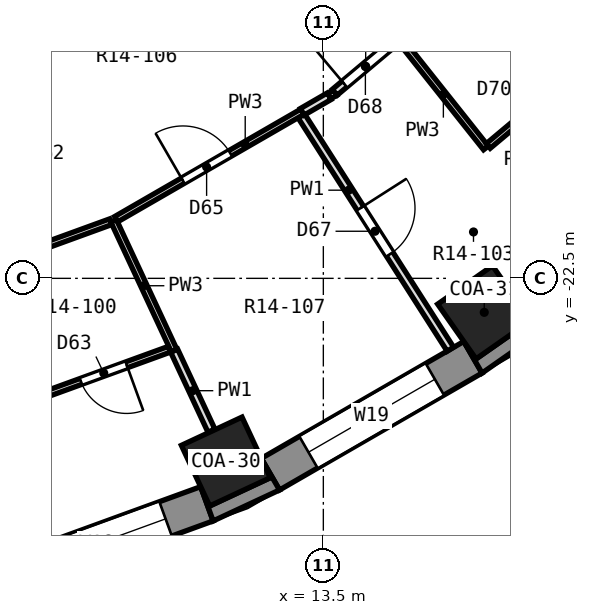
"""IFC4 building model, lengths in metres.
Left out: names, types, materials, properties, quantities, classifications, styles, units other than length and angle.
Written with IfcOpenShell. Run it as: python <this file> out.ifc"""

import sys

from ifc_helpers import new_model, si_unit, direction, frame, frame_2d, origin, origin_2d, place, context, subcontext, project, spatial, polyline, rectangle, outline, extrude, element, fill, save


model = new_model("IFC4")
c1 = context("Model", 3, precision=1e-05, world=origin(), true_north=direction((0.0, 1.0)))
c2 = subcontext(c1, "Body", "Model", "MODEL_VIEW")
j1 = project(units=[si_unit("LENGTHUNIT", "METRE"), si_unit("PLANEANGLEUNIT", "RADIAN")], contexts=[c1])
p1 = place(None, origin())
s1 = spatial("IfcSite", under=j1, at=p1, CompositionType="ELEMENT")
p2 = place(p1, origin())
s2 = spatial("IfcBuilding", under=s1, at=p2, CompositionType="ELEMENT")
p3 = place(p2, frame((0.0, 0.0, 75.8)))
s3 = spatial("IfcBuildingStorey", under=s2, at=p3, CompositionType="ELEMENT", Elevation=75.8)
for number, where, z_axis, x_axis in (
    (1, (11.897, -25.512, 0.0), (0.0, 0.0, 1.0), (0.423, -0.906, 0.0)),
    (2, (16.146, -23.059, 0.0), (0.0, 0.0, 1.0), (0.574, -0.819, 0.0)),
):
    element("IfcColumn", number, at=place(p3, frame(where, z_axis=z_axis, x_axis=x_axis)), inside=s3, PredefinedType="COLUMN", context=c2, shape_type="SweptSolid", body=[
        extrude(rectangle(XDim=1.1, YDim=1.1, at=origin_2d()), origin(), (0.0, 0.0, 1.0), 3.3),
    ])
p4 = place(p3, frame((7.971, -27.523, 0.0), z_axis=(0.0, 0.0, 1.0), x_axis=(0.939689588564, 0.342028474173, 0.0)))
e3 = element("IfcWall", 3, at=p4, inside=s3, PredefinedType="SOLIDWALL", context=c2, shape_type="SweptSolid", body=[
    extrude(rectangle(XDim=3.846, YDim=0.6, at=frame_2d((1.923, 0.0))), origin(), (0.0, 0.0, 1.0), 2.75),
])
p5 = place(p4, frame((0.723, 0.0, 0.9)))
e4 = element("IfcOpeningElement", 4, at=p5, cuts=e3, PredefinedType="OPENING", context=c2, shape_type="SweptSolid", body=[
    extrude(rectangle(XDim=2.4, YDim=1.8, at=frame_2d((1.2, 0.9))), frame((0.0, 0.312, 0.0), z_axis=(0.0, -1.0, 0.0), x_axis=(1.0, 0.0, 0.0)), (0.0, 0.0, 1.0), 0.624),
])
p6 = place(p3, frame((12.63, -25.721, 0.0), z_axis=(0.0, 0.0, 1.0), x_axis=(0.86603124159, 0.499989888488, 0.0)))
e5 = element("IfcWall", 5, at=p6, inside=s3, PredefinedType="SOLIDWALL", context=c2, shape_type="SweptSolid", body=[
    extrude(rectangle(XDim=3.846, YDim=0.6, at=frame_2d((1.923, 0.0))), origin(), (0.0, 0.0, 1.0), 2.75),
])
p7 = place(p6, frame((0.723, 0.0, 0.9)))
e6 = element("IfcOpeningElement", 6, at=p7, cuts=e5, PredefinedType="OPENING", context=c2, shape_type="SweptSolid", body=[
    extrude(rectangle(XDim=2.4, YDim=1.8, at=frame_2d((1.2, 0.9))), frame((0.0, 0.312, 0.0), z_axis=(0.0, -1.0, 0.0), x_axis=(1.0, 0.0, 0.0)), (0.0, 0.0, 1.0), 0.624),
])
p8 = place(p3, origin())
e7 = element("IfcWall", 7, at=p8, inside=s3, PredefinedType="SOLIDWALL", context=c2, shape_type="SweptSolid", body=[
    extrude(outline(polyline([(12.78, -25.981), (12.479, -25.461), (12.628, -25.779), (11.631, -26.243), (11.483, -25.926), (11.688, -26.49), (12.78, -25.981)])), origin(), (0.0, 0.0, 1.0), 2.75),
])
p9 = place(p3, origin())
e8 = element("IfcWall", 8, at=p9, inside=s3, PredefinedType="SOLIDWALL", context=c2, shape_type="SweptSolid", body=[
    extrude(outline(polyline([(16.11, -24.058), (17.097, -23.367), (16.711, -22.907), (16.912, -23.194), (16.011, -23.825), (15.81, -23.538), (16.11, -24.058)])), origin(), (0.0, 0.0, 1.0), 2.75),
])
p10 = place(p3, frame((10.05, -21.552, 0.0), z_axis=(0.0, 0.0, 1.0), x_axis=(0.422500217466, -0.906362822627, 0.0)))
e9 = element("IfcWall", 9, at=p10, inside=s3, PredefinedType="PARTITIONING", context=c2, shape_type="SweptSolid", body=[
    extrude(rectangle(XDim=2.359, YDim=0.1, at=frame_2d((1.18, 0.0))), origin(), (0.0, 0.0, 1.0), 2.75),
])
p11 = place(p3, frame((11.047, -23.69, 0.0), z_axis=(0.0, 0.0, 1.0), x_axis=(0.42247077632, -0.906376546009, 0.0)))
e10 = element("IfcWall", 10, at=p11, inside=s3, PredefinedType="PARTITIONING", context=c2, shape_type="SweptSolid", body=[
    extrude(rectangle(XDim=1.45, YDim=0.125, at=frame_2d((0.725, 0.0))), origin(), (0.0, 0.0, 1.0), 2.75),
])
p12 = place(p3, frame((13.138, -19.828, 0.0), z_axis=(0.0, 0.0, 1.0), x_axis=(0.538359660084, -0.842715181063, 0.0)))
e11 = element("IfcWall", 11, at=p12, inside=s3, PredefinedType="PARTITIONING", context=c2, shape_type="SweptSolid", body=[
    extrude(rectangle(XDim=4.553, YDim=0.125, at=frame_2d((2.276, 0.0))), origin(), (0.0, 0.0, 1.0), 2.75),
])
p13 = place(p12, frame((1.802, 0.0, 0.0)))
e12 = element("IfcOpeningElement", 12, at=p13, cuts=e11, PredefinedType="OPENING", context=c2, shape_type="SweptSolid", body=[
    extrude(rectangle(XDim=0.9, YDim=2.1, at=frame_2d((0.45, 1.05))), frame((0.0, 0.074, 0.0), z_axis=(0.0, -1.0, 0.0), x_axis=(1.0, 0.0, 0.0)), (0.0, 0.0, 1.0), 0.149),
])
p14 = place(p3, frame((14.774, -18.593, 0.0), z_axis=(0.0, 0.0, 1.0), x_axis=(0.622124779816, -0.782918104491, 0.0)))
e13 = element("IfcWall", 13, at=p14, inside=s3, PredefinedType="PARTITIONING", context=c2, shape_type="SweptSolid", body=[
    extrude(rectangle(XDim=2.25, YDim=0.1, at=frame_2d((1.125, 0.0))), origin(), (0.0, 0.0, 1.0), 2.75),
])
p15 = place(p3, frame((8.799, -24.455, 0.0), z_axis=(0.0, 0.0, 1.0), x_axis=(0.939774884543, 0.341794040882, 0.0)))
e14 = element("IfcWall", 14, at=p15, inside=s3, PredefinedType="PARTITIONING", context=c2, shape_type="SweptSolid", body=[
    extrude(rectangle(XDim=2.307, YDim=0.1, at=frame_2d((1.154, 0.0))), origin(), (0.0, 0.0, 1.0), 2.75),
])
p16 = place(p15, frame((0.76, 0.0, 0.0)))
e15 = element("IfcOpeningElement", 15, at=p16, cuts=e14, PredefinedType="OPENING", context=c2, shape_type="SweptSolid", body=[
    extrude(rectangle(XDim=0.8, YDim=2.1, at=frame_2d((0.4, 1.05))), frame((0.0, 0.062, 0.0), z_axis=(0.0, -1.0, 0.0), x_axis=(1.0, 0.0, 0.0)), (0.0, 0.0, 1.0), 0.124),
])
p17 = place(p3, frame((8.025, -22.289, 0.0), z_axis=(0.0, 0.0, 1.0), x_axis=(0.939725675468, 0.341929312674, 0.0)))
e16 = element("IfcWall", 16, at=p17, inside=s3, PredefinedType="PARTITIONING", context=c2, shape_type="SweptSolid", body=[
    extrude(rectangle(XDim=2.105, YDim=0.1, at=frame_2d((1.052, 0.0))), origin(), (0.0, 0.0, 1.0), 2.75),
])
p18 = place(p3, frame((5.251, -19.367, 0.0), z_axis=(0.0, 0.0, 1.0), x_axis=(0.86701914354, 0.498274828519, 0.0)))
e17 = element("IfcWall", 17, at=p18, inside=s3, PredefinedType="PARTITIONING", context=c2, shape_type="SweptSolid", body=[
    extrude(rectangle(XDim=10.259, YDim=0.125, at=frame_2d((5.129, 0.0))), origin(), (0.0, 0.0, 1.0), 2.75),
])
p19 = place(p3, frame((10.093, -21.527, 0.0), z_axis=(0.0, 0.0, 1.0), x_axis=(0.866092412582, 0.499883919394, 0.0)))
e18 = element("IfcWall", 18, at=p19, inside=s3, PredefinedType="PARTITIONING", context=c2, shape_type="SweptSolid", body=[
    extrude(rectangle(XDim=3.534, YDim=0.1, at=frame_2d((1.767, 0.0))), origin(), (0.0, 0.0, 1.0), 2.75),
])
p20 = place(p19, frame((1.267, 0.0, 0.0)))
e19 = element("IfcOpeningElement", 19, at=p20, cuts=e18, PredefinedType="OPENING", context=c2, shape_type="SweptSolid", body=[
    extrude(rectangle(XDim=0.9, YDim=2.1, at=frame_2d((0.45, 1.05))), frame((0.0, 0.062, 0.0), z_axis=(0.0, -1.0, 0.0), x_axis=(1.0, 0.0, 0.0)), (0.0, 0.0, 1.0), 0.124),
])
p21 = place(p3, frame((13.597, -19.505, 0.0), z_axis=(0.0, 0.0, 1.0), x_axis=(0.86665063443, 0.498915501706, 0.0)))
e20 = element("IfcWall", 20, at=p21, inside=s3, PredefinedType="PARTITIONING", context=c2, shape_type="SweptSolid", body=[
    extrude(rectangle(XDim=0.114, YDim=0.1, at=frame_2d((0.057, 0.0))), origin(), (0.0, 0.0, 1.0), 2.75),
])
p22 = place(p3, frame((13.154, -19.761, 0.0), z_axis=(0.0, 0.0, 1.0), x_axis=(0.865644253932, 0.500659590574, 0.0)))
e21 = element("IfcWall", 21, at=p22, inside=s3, PredefinedType="PARTITIONING", context=c2, shape_type="SweptSolid", body=[
    extrude(rectangle(XDim=0.511, YDim=0.125, at=frame_2d((0.255, 0.0))), origin(), (0.0, 0.0, 1.0), 2.75),
])
p23 = place(p3, frame((16.212, -20.323, 0.0), z_axis=(0.0, 0.0, 1.0), x_axis=(0.766232462385, 0.642563470474, 0.0)))
e22 = element("IfcWall", 22, at=p23, inside=s3, PredefinedType="PARTITIONING", context=c2, shape_type="SweptSolid", body=[
    extrude(rectangle(XDim=2.843, YDim=0.1, at=frame_2d((1.421, 0.0))), origin(), (0.0, 0.0, 1.0), 2.75),
])
p24 = place(p23, frame((1.034, 0.0, 0.0)))
e23 = element("IfcOpeningElement", 23, at=p24, cuts=e22, PredefinedType="OPENING", context=c2, shape_type="SweptSolid", body=[
    extrude(rectangle(XDim=0.8, YDim=2.1, at=frame_2d((0.4, 1.05))), frame((0.0, 0.062, 0.0), z_axis=(0.0, -1.0, 0.0), x_axis=(1.0, 0.0, 0.0)), (0.0, 0.0, 1.0), 0.124),
])
p25 = place(p3, frame((13.688, -19.44, 0.0), z_axis=(0.0, 0.0, 1.0), x_axis=(0.765864266058, 0.643002275249, 0.0)))
e24 = element("IfcWall", 24, at=p25, inside=s3, PredefinedType="PARTITIONING", context=c2, shape_type="SweptSolid", body=[
    extrude(rectangle(XDim=1.327, YDim=0.125, at=frame_2d((0.664, 0.0))), origin(), (0.0, 0.0, 1.0), 2.75),
])
p26 = place(p25, frame((0.208, 0.0, 0.0)))
e25 = element("IfcOpeningElement", 25, at=p26, cuts=e24, PredefinedType="OPENING", context=c2, shape_type="SweptSolid", body=[
    extrude(rectangle(XDim=0.9, YDim=2.1, at=frame_2d((0.45, 1.05))), frame((0.0, 0.074, 0.0), z_axis=(0.0, -1.0, 0.0), x_axis=(1.0, 0.0, 0.0)), (0.0, 0.0, 1.0), 0.149),
])
p27 = place(p5, origin())
e26 = element("IfcWindow", 26, at=p27, inside=s3, PartitioningType="SINGLE_PANEL", PredefinedType="WINDOW", context=c2, shape_type="SweptSolid", body=[
    extrude(rectangle(XDim=2.4, YDim=1.8, at=frame_2d((1.2, 0.9))), frame((0.0, 0.18, 0.0), z_axis=(0.0, -1.0, 0.0), x_axis=(1.0, 0.0, 0.0)), (0.0, 0.0, 1.0), 0.06),
])
fill(e4, e26)
p28 = place(p7, origin())
e27 = element("IfcWindow", 27, at=p28, inside=s3, PartitioningType="SINGLE_PANEL", PredefinedType="WINDOW", context=c2, shape_type="SweptSolid", body=[
    extrude(rectangle(XDim=2.4, YDim=1.8, at=frame_2d((1.2, 0.9))), frame((0.0, 0.18, 0.0), z_axis=(0.0, -1.0, 0.0), x_axis=(1.0, 0.0, 0.0)), (0.0, 0.0, 1.0), 0.06),
])
fill(e6, e27)
p29 = place(p16, frame((0.8, 0.0, 0.0), z_axis=(0.0, 0.0, 1.0), x_axis=(-1.0, 0.0, 0.0)))
e28 = element("IfcDoor", 28, at=p29, inside=s3, OperationType="SINGLE_SWING_LEFT", PredefinedType="DOOR", context=c2, shape_type="SweptSolid", body=[
    extrude(rectangle(XDim=0.8, YDim=2.1, at=frame_2d((0.4, 1.05))), frame((0.0, 0.025, 0.0), z_axis=(0.0, -1.0, 0.0), x_axis=(1.0, 0.0, 0.0)), (0.0, 0.0, 1.0), 0.05),
])
fill(e15, e28)
p30 = place(p20, origin())
e29 = element("IfcDoor", 29, at=p30, inside=s3, OperationType="SINGLE_SWING_LEFT", PredefinedType="DOOR", context=c2, shape_type="SweptSolid", body=[
    extrude(rectangle(XDim=0.9, YDim=2.1, at=frame_2d((0.45, 1.05))), frame((0.0, 0.025, 0.0), z_axis=(0.0, -1.0, 0.0), x_axis=(1.0, 0.0, 0.0)), (0.0, 0.0, 1.0), 0.05),
])
fill(e19, e29)
p31 = place(p13, origin())
e30 = element("IfcDoor", 30, at=p31, inside=s3, OperationType="SINGLE_SWING_LEFT", PredefinedType="DOOR", context=c2, shape_type="SweptSolid", body=[
    extrude(rectangle(XDim=0.9, YDim=2.1, at=frame_2d((0.45, 1.05))), frame((0.0, 0.025, 0.0), z_axis=(0.0, -1.0, 0.0), x_axis=(1.0, 0.0, 0.0)), (0.0, 0.0, 1.0), 0.05),
])
fill(e12, e30)
p32 = place(p26, origin())
e31 = element("IfcDoor", 31, at=p32, inside=s3, OperationType="SINGLE_SWING_LEFT", PredefinedType="DOOR", context=c2, shape_type="SweptSolid", body=[
    extrude(rectangle(XDim=0.9, YDim=2.1, at=frame_2d((0.45, 1.05))), frame((0.0, 0.025, 0.0), z_axis=(0.0, -1.0, 0.0), x_axis=(1.0, 0.0, 0.0)), (0.0, 0.0, 1.0), 0.05),
])
fill(e25, e31)
save(model, sys.argv[1])
